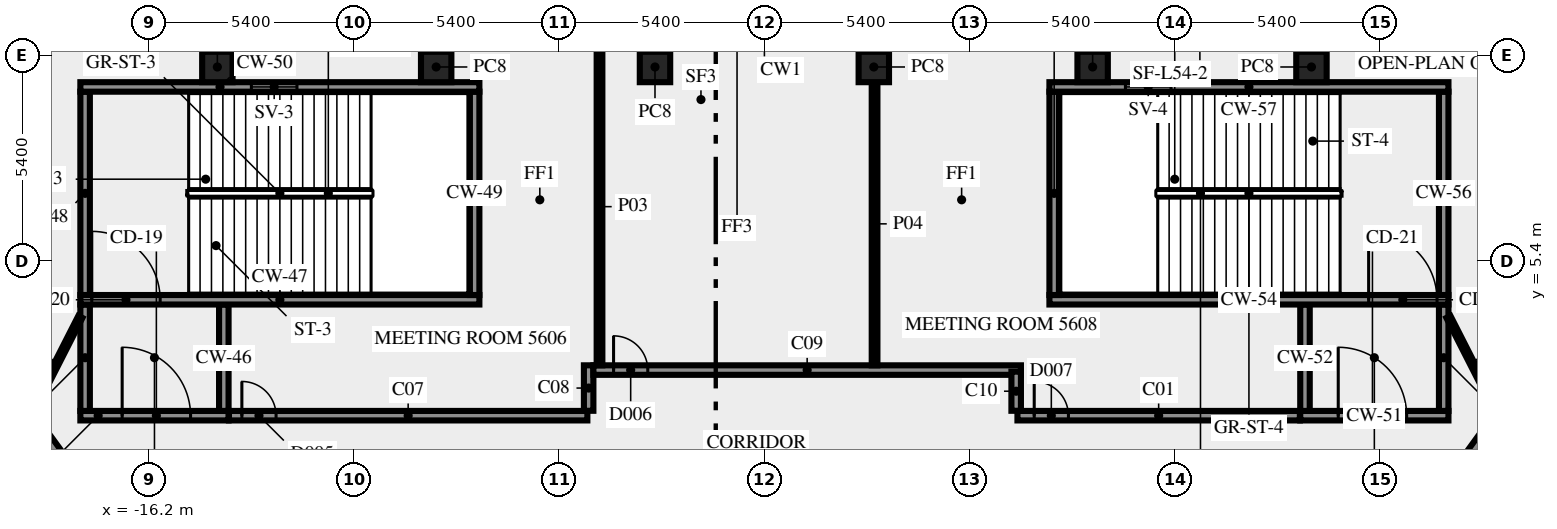
"""IFC4 building model, lengths in metres.
Left out: names, types, materials, properties, quantities, classifications, styles, units other than length and angle.
Written with IfcOpenShell. Run it as: python <this file> out.ifc"""

import sys

from ifc_helpers import new_model, si_unit, direction, frame, frame_2d, origin, origin_2d, place, context, subcontext, project, spatial, rectangle, extrude, element, fill, save


model = new_model("IFC4")
c1 = context("Model", 3, precision=1e-05, world=origin(), true_north=direction((0.0, 1.0)))
c2 = subcontext(c1, "Body", "Model", "MODEL_VIEW")
j1 = project(units=[si_unit("LENGTHUNIT", "METRE"), si_unit("PLANEANGLEUNIT", "RADIAN")], contexts=[c1])
p1 = place(None, origin())
s1 = spatial("IfcSite", under=j1, at=p1, CompositionType="ELEMENT")
p2 = place(p1, origin())
s2 = spatial("IfcBuilding", under=s1, at=p2, CompositionType="ELEMENT")
p3 = place(p2, frame((0.0, 0.0, 238.0)))
s3 = spatial("IfcBuildingStorey", under=s2, at=p3, CompositionType="ELEMENT", Elevation=238.0)
for number, where, z_axis, x_axis in (
    (1, (14.395, 10.5, 0.0), (0.0, 0.0, 1.0), (-1.0, 0.0, 0.0)),
    (2, (8.637, 10.5, 0.0), (0.0, 0.0, 1.0), (-1.0, 0.0, 0.0)),
    (3, (2.879, 10.5, 0.0), (0.0, 0.0, 1.0), (-1.0, 0.0, 0.0)),
    (4, (-2.879, 10.5, 0.0), (0.0, 0.0, 1.0), (-1.0, 0.0, 0.0)),
    (5, (-8.637, 10.5, 0.0), (0.0, 0.0, 1.0), (-1.0, 0.0, 0.0)),
    (6, (-14.395, 10.5, 0.0), (0.0, 0.0, 1.0), (-1.0, 0.0, 0.0)),
):
    element("IfcColumn", number, at=place(p3, frame(where, z_axis=z_axis, x_axis=x_axis)), inside=s3, PredefinedType="COLUMN", context=c2, shape_type="SweptSolid", body=[
        extrude(rectangle(XDim=0.8, YDim=0.8, at=origin_2d()), origin(), (0.0, 0.0, 1.0), 3.4),
    ])
p4 = place(p3, frame((-18.0, 1.325, 0.0), z_axis=(0.0, 0.0, 1.0), x_axis=(1.0, 0.0, 0.0)))
e7 = element("IfcWall", 7, at=p4, inside=s3, PredefinedType="SHEAR", context=c2, shape_type="SweptSolid", body=[
    extrude(rectangle(XDim=3.9, YDim=0.25, at=frame_2d((1.95, 0.0))), origin(), (0.0, 0.0, 1.0), 3.4),
])
p5 = place(p4, frame((1.1, 0.0, 0.0)))
e8 = element("IfcOpeningElement", 8, at=p5, cuts=e7, PredefinedType="OPENING", context=c2, shape_type="SweptSolid", body=[
    extrude(rectangle(XDim=1.8, YDim=2.1, at=frame_2d((0.9, 1.05))), frame((0.0, 0.135, 0.0), z_axis=(0.0, -1.0, 0.0), x_axis=(1.0, 0.0, 0.0)), (0.0, 0.0, 1.0), 0.27),
])
for number, where, z_axis, x_axis in (
    (9, (-17.875, 1.45, 0.0), (0.0, 0.0, 1.0), (0.0, 1.0, 0.0)),
    (10, (-14.225, 1.45, 0.0), (0.0, 0.0, 1.0), (0.0, 1.0, 0.0)),
):
    element("IfcWall", number, at=place(p3, frame(where, z_axis=z_axis, x_axis=x_axis)), inside=s3, PredefinedType="SHEAR", context=c2, shape_type="SweptSolid", body=[
        extrude(rectangle(XDim=2.8, YDim=0.25, at=frame_2d((1.4, 0.0))), origin(), (0.0, 0.0, 1.0), 3.4),
    ])
p6 = place(p3, frame((-18.0, 4.375, 0.0), z_axis=(0.0, 0.0, 1.0), x_axis=(1.0, 0.0, 0.0)))
e11 = element("IfcWall", 11, at=p6, inside=s3, PredefinedType="SHEAR", context=c2, shape_type="SweptSolid", body=[
    extrude(rectangle(XDim=10.5, YDim=0.25, at=frame_2d((5.25, 0.0))), origin(), (0.0, 0.0, 1.0), 3.4),
])
p7 = place(p6, frame((0.3, 0.0, 0.0)))
e12 = element("IfcOpeningElement", 12, at=p7, cuts=e11, PredefinedType="OPENING", context=c2, shape_type="SweptSolid", body=[
    extrude(rectangle(XDim=1.8, YDim=2.1, at=frame_2d((0.9, 1.05))), frame((0.0, 0.135, 0.0), z_axis=(0.0, -1.0, 0.0), x_axis=(1.0, 0.0, 0.0)), (0.0, 0.0, 1.0), 0.27),
])
for number, where, z_axis, x_axis in (
    (13, (-17.875, 4.5, 0.0), (0.0, 0.0, 1.0), (0.0, 1.0, 0.0)),
    (14, (-7.625, 4.5, 0.0), (0.0, 0.0, 1.0), (0.0, 1.0, 0.0)),
):
    element("IfcWall", number, at=place(p3, frame(where, z_axis=z_axis, x_axis=x_axis)), inside=s3, PredefinedType="SHEAR", context=c2, shape_type="SweptSolid", body=[
        extrude(rectangle(XDim=5.35, YDim=0.25, at=frame_2d((2.675, 0.0))), origin(), (0.0, 0.0, 1.0), 3.4),
    ])
p8 = place(p3, frame((-18.0, 9.975, 0.0), z_axis=(0.0, 0.0, 1.0), x_axis=(1.0, 0.0, 0.0)))
e15 = element("IfcWall", 15, at=p8, inside=s3, PredefinedType="SHEAR", context=c2, shape_type="SweptSolid", body=[
    extrude(rectangle(XDim=10.5, YDim=0.25, at=frame_2d((5.25, 0.0))), origin(), (0.0, 0.0, 1.0), 3.4),
])
p9 = place(p8, frame((4.5, 0.0, 1.0)))
e16 = element("IfcOpeningElement", 16, at=p9, cuts=e15, PredefinedType="OPENING", context=c2, shape_type="SweptSolid", body=[
    extrude(rectangle(XDim=1.2, YDim=1.2, at=frame_2d((0.6, 0.6))), frame((0.0, 0.135, 0.0), z_axis=(0.0, -1.0, 0.0), x_axis=(1.0, 0.0, 0.0)), (0.0, 0.0, 1.0), 0.27),
])
p10 = place(p3, frame((14.1, 1.325, 0.0), z_axis=(0.0, 0.0, 1.0), x_axis=(1.0, 0.0, 0.0)))
e17 = element("IfcWall", 17, at=p10, inside=s3, PredefinedType="SHEAR", context=c2, shape_type="SweptSolid", body=[
    extrude(rectangle(XDim=3.9, YDim=0.25, at=frame_2d((1.95, 0.0))), origin(), (0.0, 0.0, 1.0), 3.4),
])
p11 = place(p10, frame((1.0, 0.0, 0.0)))
e18 = element("IfcOpeningElement", 18, at=p11, cuts=e17, PredefinedType="OPENING", context=c2, shape_type="SweptSolid", body=[
    extrude(rectangle(XDim=1.8, YDim=2.1, at=frame_2d((0.9, 1.05))), frame((0.0, 0.135, 0.0), z_axis=(0.0, -1.0, 0.0), x_axis=(1.0, 0.0, 0.0)), (0.0, 0.0, 1.0), 0.27),
])
for number, where, z_axis, x_axis in (
    (19, (14.225, 1.45, 0.0), (0.0, 0.0, 1.0), (0.0, 1.0, 0.0)),
    (20, (17.875, 1.45, 0.0), (0.0, 0.0, 1.0), (0.0, 1.0, 0.0)),
):
    element("IfcWall", number, at=place(p3, frame(where, z_axis=z_axis, x_axis=x_axis)), inside=s3, PredefinedType="SHEAR", context=c2, shape_type="SweptSolid", body=[
        extrude(rectangle(XDim=2.8, YDim=0.25, at=frame_2d((1.4, 0.0))), origin(), (0.0, 0.0, 1.0), 3.4),
    ])
p12 = place(p3, frame((7.5, 4.375, 0.0), z_axis=(0.0, 0.0, 1.0), x_axis=(1.0, 0.0, 0.0)))
e21 = element("IfcWall", 21, at=p12, inside=s3, PredefinedType="SHEAR", context=c2, shape_type="SweptSolid", body=[
    extrude(rectangle(XDim=10.5, YDim=0.25, at=frame_2d((5.25, 0.0))), origin(), (0.0, 0.0, 1.0), 3.4),
])
p13 = place(p12, frame((8.4, 0.0, 0.0)))
e22 = element("IfcOpeningElement", 22, at=p13, cuts=e21, PredefinedType="OPENING", context=c2, shape_type="SweptSolid", body=[
    extrude(rectangle(XDim=1.8, YDim=2.1, at=frame_2d((0.9, 1.05))), frame((0.0, 0.135, 0.0), z_axis=(0.0, -1.0, 0.0), x_axis=(1.0, 0.0, 0.0)), (0.0, 0.0, 1.0), 0.27),
])
for number, where, z_axis, x_axis in (
    (23, (7.625, 4.5, 0.0), (0.0, 0.0, 1.0), (0.0, 1.0, 0.0)),
    (24, (17.875, 4.5, 0.0), (0.0, 0.0, 1.0), (0.0, 1.0, 0.0)),
):
    element("IfcWall", number, at=place(p3, frame(where, z_axis=z_axis, x_axis=x_axis)), inside=s3, PredefinedType="SHEAR", context=c2, shape_type="SweptSolid", body=[
        extrude(rectangle(XDim=5.35, YDim=0.25, at=frame_2d((2.675, 0.0))), origin(), (0.0, 0.0, 1.0), 3.4),
    ])
p14 = place(p3, frame((7.5, 9.975, 0.0), z_axis=(0.0, 0.0, 1.0), x_axis=(1.0, 0.0, 0.0)))
e25 = element("IfcWall", 25, at=p14, inside=s3, PredefinedType="SHEAR", context=c2, shape_type="SweptSolid", body=[
    extrude(rectangle(XDim=10.5, YDim=0.25, at=frame_2d((5.25, 0.0))), origin(), (0.0, 0.0, 1.0), 3.4),
])
p15 = place(p14, frame((2.0, 0.0, 1.0)))
e26 = element("IfcOpeningElement", 26, at=p15, cuts=e25, PredefinedType="OPENING", context=c2, shape_type="SweptSolid", body=[
    extrude(rectangle(XDim=1.2, YDim=1.2, at=frame_2d((0.6, 0.6))), frame((0.0, 0.135, 0.0), z_axis=(0.0, -1.0, 0.0), x_axis=(1.0, 0.0, 0.0)), (0.0, 0.0, 1.0), 0.27),
])
p16 = place(p3, frame((6.659, 1.325, 0.0), z_axis=(0.0, 0.0, 1.0), x_axis=(1.0, 0.0, 0.0)))
e27 = element("IfcWall", 27, at=p16, inside=s3, PredefinedType="SOLIDWALL", context=c2, shape_type="SweptSolid", body=[
    extrude(rectangle(XDim=7.431, YDim=0.25, at=frame_2d((3.716, 0.0))), origin(), (0.0, 0.0, 1.0), 3.4),
])
p17 = place(p16, frame((0.441, 0.0, 0.0)))
e28 = element("IfcOpeningElement", 28, at=p17, cuts=e27, PredefinedType="OPENING", context=c2, shape_type="SweptSolid", body=[
    extrude(rectangle(XDim=0.9, YDim=2.1, at=frame_2d((0.45, 1.05))), frame((0.0, 0.135, 0.0), z_axis=(0.0, -1.0, 0.0), x_axis=(1.0, 0.0, 0.0)), (0.0, 0.0, 1.0), 0.27),
])
p18 = place(p3, frame((17.545, -1.125, 0.0), z_axis=(0.0, 0.0, 1.0), x_axis=(0.587796810203, 0.809008596935, 0.0)))
e29 = element("IfcWall", 29, at=p18, inside=s3, PredefinedType="SOLIDWALL", context=c2, shape_type="SweptSolid", body=[
    extrude(rectangle(XDim=12.703, YDim=0.25, at=frame_2d((6.352, 0.0))), origin(), (0.0, 0.0, 1.0), 3.4),
])
p19 = place(p18, frame((11.329, 0.0, 0.0)))
e30 = element("IfcOpeningElement", 30, at=p19, cuts=e29, PredefinedType="OPENING", context=c2, shape_type="SweptSolid", body=[
    extrude(rectangle(XDim=0.9, YDim=2.1, at=frame_2d((0.45, 1.05))), frame((0.0, 0.135, 0.0), z_axis=(0.0, -1.0, 0.0), x_axis=(1.0, 0.0, 0.0)), (0.0, 0.0, 1.0), 0.27),
])
p20 = place(p3, frame((-38.32, 27.469, 0.0), z_axis=(0.0, 0.0, 1.0), x_axis=(0.587788021768, -0.809014982226, 0.0)))
e31 = element("IfcWall", 31, at=p20, inside=s3, PredefinedType="SOLIDWALL", context=c2, shape_type="SweptSolid", body=[
    extrude(rectangle(XDim=35.344, YDim=0.25, at=frame_2d((17.672, 0.0))), origin(), (0.0, 0.0, 1.0), 3.4),
])
p21 = place(p20, frame((31.003, 0.0, 0.0)))
e32 = element("IfcOpeningElement", 32, at=p21, cuts=e31, PredefinedType="OPENING", context=c2, shape_type="SweptSolid", body=[
    extrude(rectangle(XDim=0.9, YDim=2.1, at=frame_2d((0.45, 1.05))), frame((0.0, 0.135, 0.0), z_axis=(0.0, -1.0, 0.0), x_axis=(1.0, 0.0, 0.0)), (0.0, 0.0, 1.0), 0.27),
])
p22 = place(p20, frame((11.286, 0.0, 0.0)))
e33 = element("IfcOpeningElement", 33, at=p22, cuts=e31, PredefinedType="OPENING", context=c2, shape_type="SweptSolid", body=[
    extrude(rectangle(XDim=0.9, YDim=2.1, at=frame_2d((0.45, 1.05))), frame((0.0, 0.135, 0.0), z_axis=(0.0, -1.0, 0.0), x_axis=(1.0, 0.0, 0.0)), (0.0, 0.0, 1.0), 0.27),
])
p23 = place(p3, frame((-14.09, 1.325, 0.0), z_axis=(0.0, 0.0, 1.0), x_axis=(1.0, 0.0, 0.0)))
e34 = element("IfcWall", 34, at=p23, inside=s3, PredefinedType="SOLIDWALL", context=c2, shape_type="SweptSolid", body=[
    extrude(rectangle(XDim=9.431, YDim=0.25, at=frame_2d((4.716, 0.0))), origin(), (0.0, 0.0, 1.0), 3.4),
])
p24 = place(p23, frame((0.34, 0.0, 0.0)))
e35 = element("IfcOpeningElement", 35, at=p24, cuts=e34, PredefinedType="OPENING", context=c2, shape_type="SweptSolid", body=[
    extrude(rectangle(XDim=0.9, YDim=2.1, at=frame_2d((0.45, 1.05))), frame((0.0, 0.135, 0.0), z_axis=(0.0, -1.0, 0.0), x_axis=(1.0, 0.0, 0.0)), (0.0, 0.0, 1.0), 0.27),
])
p25 = place(p3, frame((-4.625, 1.454, 0.0), z_axis=(0.0, 0.0, 1.0), x_axis=(0.0, 1.0, 0.0)))
e36 = element("IfcWall", 36, at=p25, inside=s3, PredefinedType="SOLIDWALL", context=c2, shape_type="SweptSolid", body=[
    extrude(rectangle(XDim=1.196, YDim=0.25, at=frame_2d((0.598, 0.0))), origin(), (0.0, 0.0, 1.0), 3.4),
])
p26 = place(p3, frame((-4.5, 2.525, 0.0), z_axis=(0.0, 0.0, 1.0), x_axis=(1.0, 0.0, 0.0)))
e37 = element("IfcWall", 37, at=p26, inside=s3, PredefinedType="SOLIDWALL", context=c2, shape_type="SweptSolid", body=[
    extrude(rectangle(XDim=11.25, YDim=0.25, at=frame_2d((5.625, 0.0))), origin(), (0.0, 0.0, 1.0), 3.4),
])
p27 = place(p26, frame((0.531, 0.0, 0.0)))
e38 = element("IfcOpeningElement", 38, at=p27, cuts=e37, PredefinedType="OPENING", context=c2, shape_type="SweptSolid", body=[
    extrude(rectangle(XDim=0.9, YDim=2.1, at=frame_2d((0.45, 1.05))), frame((0.0, 0.135, 0.0), z_axis=(0.0, -1.0, 0.0), x_axis=(1.0, 0.0, 0.0)), (0.0, 0.0, 1.0), 0.27),
])
p28 = place(p3, frame((6.625, 2.484, 0.0), z_axis=(0.0, 0.0, 1.0), x_axis=(0.0, -1.0, 0.0)))
e39 = element("IfcWall", 39, at=p28, inside=s3, PredefinedType="SOLIDWALL", context=c2, shape_type="SweptSolid", body=[
    extrude(rectangle(XDim=1.03, YDim=0.25, at=frame_2d((0.515, 0.0))), origin(), (0.0, 0.0, 1.0), 3.4),
])
p29 = place(p3, frame((24.898, 9.209, 0.0), z_axis=(0.0, 0.0, 1.0), x_axis=(-0.809013490065, 0.587790075531, 0.0)))
e40 = element("IfcWall", 40, at=p29, inside=s3, PredefinedType="PARTITIONING", context=c2, shape_type="SweptSolid", body=[
    extrude(rectangle(XDim=9.549, YDim=0.12, at=frame_2d((4.775, 0.0))), origin(), (0.0, 0.0, 1.0), 2.6),
])
p30 = place(p3, frame((-4.339, 2.65, 0.0), z_axis=(0.0, 0.0, 1.0), x_axis=(0.0, 1.0, 0.0)))
e41 = element("IfcWall", 41, at=p30, inside=s3, PredefinedType="PARTITIONING", context=c2, shape_type="SweptSolid", body=[
    extrude(rectangle(XDim=8.35, YDim=0.15, at=frame_2d((4.175, 0.0))), origin(), (0.0, 0.0, 1.0), 2.6),
])
p31 = place(p3, frame((2.899, 10.095, 0.0), z_axis=(0.0, 0.0, 1.0), x_axis=(0.0, -1.0, 0.0)))
e42 = element("IfcWall", 42, at=p31, inside=s3, PredefinedType="PARTITIONING", context=c2, shape_type="SweptSolid", body=[
    extrude(rectangle(XDim=7.445, YDim=0.15, at=frame_2d((3.723, 0.0))), origin(), (0.0, 0.0, 1.0), 3.4),
])
for number, where, z_axis, x_axis in (
    (43, (18.0, 3.925, 0.0), (0.0, 0.0, 1.0), (0.454, -0.891, 0.0)),
    (44, (-19.261, 1.45, 0.0), (0.0, 0.0, 1.0), (0.454, 0.891, 0.0)),
):
    element("IfcWall", number, at=place(p3, frame(where, z_axis=z_axis, x_axis=x_axis)), inside=s3, PredefinedType="PARTITIONING", context=c2, shape_type="SweptSolid", body=[
        extrude(rectangle(XDim=2.778, YDim=0.12, at=frame_2d((1.389, 0.0))), origin(), (0.0, 0.0, 1.0), 3.4),
    ])
p32 = place(p5, origin())
e45 = element("IfcDoor", 45, at=p32, inside=s3, OperationType="DOUBLE_DOOR_SINGLE_SWING", PredefinedType="DOOR", context=c2, shape_type="SweptSolid", body=[
    extrude(rectangle(XDim=1.8, YDim=2.1, at=frame_2d((0.9, 1.05))), frame((0.0, 0.025, 0.0), z_axis=(0.0, -1.0, 0.0), x_axis=(1.0, 0.0, 0.0)), (0.0, 0.0, 1.0), 0.05),
])
fill(e8, e45)
p33 = place(p7, origin())
e46 = element("IfcDoor", 46, at=p33, inside=s3, OperationType="DOUBLE_DOOR_SINGLE_SWING", PredefinedType="DOOR", context=c2, shape_type="SweptSolid", body=[
    extrude(rectangle(XDim=1.8, YDim=2.1, at=frame_2d((0.9, 1.05))), frame((0.0, 0.025, 0.0), z_axis=(0.0, -1.0, 0.0), x_axis=(1.0, 0.0, 0.0)), (0.0, 0.0, 1.0), 0.05),
])
fill(e12, e46)
p34 = place(p9, origin())
e47 = element("IfcWindow", 47, at=p34, inside=s3, PartitioningType="SINGLE_PANEL", PredefinedType="WINDOW", context=c2, shape_type="SweptSolid", body=[
    extrude(rectangle(XDim=1.2, YDim=1.2, at=frame_2d((0.6, 0.6))), frame((0.0, 0.03, 0.0), z_axis=(0.0, -1.0, 0.0), x_axis=(1.0, 0.0, 0.0)), (0.0, 0.0, 1.0), 0.06),
])
fill(e16, e47)
p35 = place(p11, origin())
e48 = element("IfcDoor", 48, at=p35, inside=s3, OperationType="DOUBLE_DOOR_SINGLE_SWING", PredefinedType="DOOR", context=c2, shape_type="SweptSolid", body=[
    extrude(rectangle(XDim=1.8, YDim=2.1, at=frame_2d((0.9, 1.05))), frame((0.0, 0.025, 0.0), z_axis=(0.0, -1.0, 0.0), x_axis=(1.0, 0.0, 0.0)), (0.0, 0.0, 1.0), 0.05),
])
fill(e18, e48)
p36 = place(p13, origin())
e49 = element("IfcDoor", 49, at=p36, inside=s3, OperationType="DOUBLE_DOOR_SINGLE_SWING", PredefinedType="DOOR", context=c2, shape_type="SweptSolid", body=[
    extrude(rectangle(XDim=1.8, YDim=2.1, at=frame_2d((0.9, 1.05))), frame((0.0, 0.025, 0.0), z_axis=(0.0, -1.0, 0.0), x_axis=(1.0, 0.0, 0.0)), (0.0, 0.0, 1.0), 0.05),
])
fill(e22, e49)
p37 = place(p15, origin())
e50 = element("IfcWindow", 50, at=p37, inside=s3, PartitioningType="SINGLE_PANEL", PredefinedType="WINDOW", context=c2, shape_type="SweptSolid", body=[
    extrude(rectangle(XDim=1.2, YDim=1.2, at=frame_2d((0.6, 0.6))), frame((0.0, 0.03, 0.0), z_axis=(0.0, -1.0, 0.0), x_axis=(1.0, 0.0, 0.0)), (0.0, 0.0, 1.0), 0.06),
])
fill(e26, e50)
p38 = place(p24, origin())
e51 = element("IfcDoor", 51, at=p38, inside=s3, OperationType="SINGLE_SWING_LEFT", PredefinedType="DOOR", context=c2, shape_type="SweptSolid", body=[
    extrude(rectangle(XDim=0.9, YDim=2.1, at=frame_2d((0.45, 1.05))), frame((0.0, 0.025, 0.0), z_axis=(0.0, -1.0, 0.0), x_axis=(1.0, 0.0, 0.0)), (0.0, 0.0, 1.0), 0.05),
])
fill(e35, e51)
p39 = place(p17, origin())
e52 = element("IfcDoor", 52, at=p39, inside=s3, OperationType="SINGLE_SWING_LEFT", PredefinedType="DOOR", context=c2, shape_type="SweptSolid", body=[
    extrude(rectangle(XDim=0.9, YDim=2.1, at=frame_2d((0.45, 1.05))), frame((0.0, 0.025, 0.0), z_axis=(0.0, -1.0, 0.0), x_axis=(1.0, 0.0, 0.0)), (0.0, 0.0, 1.0), 0.05),
])
fill(e28, e52)
p40 = place(p27, origin())
e53 = element("IfcDoor", 53, at=p40, inside=s3, OperationType="SINGLE_SWING_LEFT", PredefinedType="DOOR", context=c2, shape_type="SweptSolid", body=[
    extrude(rectangle(XDim=0.9, YDim=2.1, at=frame_2d((0.45, 1.05))), frame((0.0, 0.025, 0.0), z_axis=(0.0, -1.0, 0.0), x_axis=(1.0, 0.0, 0.0)), (0.0, 0.0, 1.0), 0.05),
])
fill(e38, e53)
save(model, sys.argv[1])
